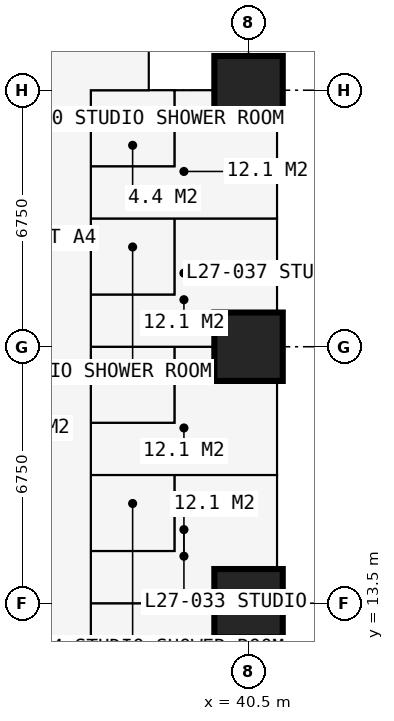
"""IFC4 building model, lengths in metres.
Left out: names, types, materials, properties, quantities, classifications, styles, units other than length and angle.
Written with IfcOpenShell. Run it as: python <this file> out.ifc"""

import sys

from ifc_helpers import new_model, si_unit, direction, frame, frame_2d, origin, origin_2d, place, context, subcontext, project, spatial, rectangle, extrude, element, fill, save


model = new_model("IFC4")
c1 = context("Model", 3, precision=1e-05, world=origin(), true_north=direction((0.0, 1.0)))
c2 = subcontext(c1, "Body", "Model", "MODEL_VIEW")
j1 = project(units=[si_unit("LENGTHUNIT", "METRE"), si_unit("PLANEANGLEUNIT", "RADIAN")], contexts=[c1])
p1 = place(None, origin())
s1 = spatial("IfcSite", under=j1, at=p1, CompositionType="ELEMENT")
p2 = place(p1, origin())
s2 = spatial("IfcBuilding", under=s1, at=p2, CompositionType="ELEMENT")
p3 = place(p2, frame((0.0, 0.0, 101.7)))
s3 = spatial("IfcBuildingStorey", under=s2, at=p3, CompositionType="ELEMENT", Elevation=101.7)
for number, where, z_axis, x_axis in (
    (1, (40.5, 13.5, 0.0), (0.0, 0.0, 1.0), (1.0, 0.0, 0.0)),
    (2, (40.5, 20.25, 0.0), (0.0, 0.0, 1.0), (1.0, 0.0, 0.0)),
    (3, (40.5, 27.0, 0.0), (0.0, 0.0, 1.0), (1.0, 0.0, 0.0)),
):
    element("IfcColumn", number, at=place(p3, frame(where, z_axis=z_axis, x_axis=x_axis)), inside=s3, PredefinedType="COLUMN", context=c2, shape_type="SweptSolid", body=[
        extrude(rectangle(XDim=1.8, YDim=1.8, at=origin_2d()), origin(), (0.0, 0.0, 1.0), 3.6),
    ])
p4 = place(p3, frame((41.25, 20.25, 0.0), z_axis=(0.0, 0.0, 1.0), x_axis=(0.0, -1.0, 0.0)))
e4 = element("IfcWall", 4, at=p4, inside=s3, PredefinedType="SOLIDWALL", context=c2, shape_type="SweptSolid", body=[
    extrude(rectangle(XDim=6.75, YDim=0.15, at=frame_2d((3.375, 0.0))), origin(), (0.0, 0.0, 1.0), 3.375),
])
p5 = place(p4, frame((0.962, 0.0, 0.0)))
e5 = element("IfcOpeningElement", 5, at=p5, cuts=e4, PredefinedType="OPENING", context=c2, shape_type="SweptSolid", body=[
    extrude(rectangle(XDim=1.0, YDim=2.2, at=frame_2d((0.5, 1.1))), frame((0.0, 0.085, 0.0), z_axis=(0.0, -1.0, 0.0), x_axis=(1.0, 0.0, 0.0)), (0.0, 0.0, 1.0), 0.17),
])
p6 = place(p4, frame((2.025, 0.0, 0.9)))
e6 = element("IfcOpeningElement", 6, at=p6, cuts=e4, PredefinedType="OPENING", context=c2, shape_type="SweptSolid", body=[
    extrude(rectangle(XDim=1.2, YDim=1.8, at=frame_2d((0.6, 0.9))), frame((0.0, 0.085, 0.0), z_axis=(0.0, -1.0, 0.0), x_axis=(1.0, 0.0, 0.0)), (0.0, 0.0, 1.0), 0.17),
])
p7 = place(p4, frame((4.788, 0.0, 0.0)))
e7 = element("IfcOpeningElement", 7, at=p7, cuts=e4, PredefinedType="OPENING", context=c2, shape_type="SweptSolid", body=[
    extrude(rectangle(XDim=1.0, YDim=2.2, at=frame_2d((0.5, 1.1))), frame((0.0, 0.085, 0.0), z_axis=(0.0, -1.0, 0.0), x_axis=(1.0, 0.0, 0.0)), (0.0, 0.0, 1.0), 0.17),
])
p8 = place(p4, frame((3.525, 0.0, 0.9)))
e8 = element("IfcOpeningElement", 8, at=p8, cuts=e4, PredefinedType="OPENING", context=c2, shape_type="SweptSolid", body=[
    extrude(rectangle(XDim=1.2, YDim=1.8, at=frame_2d((0.6, 0.9))), frame((0.0, 0.085, 0.0), z_axis=(0.0, -1.0, 0.0), x_axis=(1.0, 0.0, 0.0)), (0.0, 0.0, 1.0), 0.17),
])
p9 = place(p3, frame((41.25, 27.75, 0.0), z_axis=(0.0, 0.0, 1.0), x_axis=(-1.0, 0.0, 0.0)))
e9 = element("IfcWall", 9, at=p9, inside=s3, PredefinedType="SOLIDWALL", context=c2, shape_type="SweptSolid", body=[
    extrude(rectangle(XDim=3.375, YDim=0.3, at=frame_2d((1.688, 0.0))), origin(), (0.0, 0.0, 1.0), 3.375),
])
p10 = place(p9, frame((1.833, 0.0, 0.9)))
e10 = element("IfcOpeningElement", 10, at=p10, cuts=e9, PredefinedType="OPENING", context=c2, shape_type="SweptSolid", body=[
    extrude(rectangle(XDim=1.2, YDim=1.8, at=frame_2d((0.6, 0.9))), frame((0.0, 0.16, 0.0), z_axis=(0.0, -1.0, 0.0), x_axis=(1.0, 0.0, 0.0)), (0.0, 0.0, 1.0), 0.32),
])
p11 = place(p3, frame((37.875, 27.75, 0.0), z_axis=(0.0, 0.0, 1.0), x_axis=(0.0, 1.0, 0.0)))
e11 = element("IfcWall", 11, at=p11, inside=s3, PredefinedType="SOLIDWALL", context=c2, shape_type="SweptSolid", body=[
    extrude(rectangle(XDim=3.375, YDim=0.3, at=frame_2d((1.688, 0.0))), origin(), (0.0, 0.0, 1.0), 3.375),
])
p12 = place(p11, frame((0.788, 0.0, 0.6)))
e12 = element("IfcOpeningElement", 12, at=p12, cuts=e11, PredefinedType="OPENING", context=c2, shape_type="SweptSolid", body=[
    extrude(rectangle(XDim=1.8, YDim=2.1, at=frame_2d((0.9, 1.05))), frame((0.0, 0.16, 0.0), z_axis=(0.0, -1.0, 0.0), x_axis=(1.0, 0.0, 0.0)), (0.0, 0.0, 1.0), 0.32),
])
p13 = place(p3, frame((41.35, 16.875, 0.0), z_axis=(0.0, 0.0, 1.0), x_axis=(1.0, 0.0, 0.0)))
e13 = element("IfcWall", 13, at=p13, inside=s3, PredefinedType="USERDEFINED", context=c2, shape_type="SweptSolid", body=[
    extrude(rectangle(XDim=2.2, YDim=1.0, at=frame_2d((1.1, 0.0))), origin(), (0.0, 0.0, 1.0), 0.9),
])
p14 = place(p3, frame((36.35, 6.75, 0.0), z_axis=(0.0, 0.0, 1.0), x_axis=(0.0, 1.0, 0.0)))
e14 = element("IfcWall", 14, at=p14, inside=s3, PredefinedType="PARTITIONING", context=c2, shape_type="SweptSolid", body=[
    extrude(rectangle(XDim=20.25, YDim=0.15, at=frame_2d((10.125, 0.0))), origin(), (0.0, 0.0, 1.0), 3.375),
])
p15 = place(p14, frame((6.95, 0.0, 0.0)))
e15 = element("IfcOpeningElement", 15, at=p15, cuts=e14, PredefinedType="OPENING", context=c2, shape_type="SweptSolid", body=[
    extrude(rectangle(XDim=0.95, YDim=2.2, at=frame_2d((0.475, 1.1))), frame((0.0, 0.085, 0.0), z_axis=(0.0, -1.0, 0.0), x_axis=(1.0, 0.0, 0.0)), (0.0, 0.0, 1.0), 0.17),
])
p16 = place(p14, frame((10.375, 0.0, 0.0)))
e16 = element("IfcOpeningElement", 16, at=p16, cuts=e14, PredefinedType="OPENING", context=c2, shape_type="SweptSolid", body=[
    extrude(rectangle(XDim=0.95, YDim=2.2, at=frame_2d((0.475, 1.1))), frame((0.0, 0.085, 0.0), z_axis=(0.0, -1.0, 0.0), x_axis=(1.0, 0.0, 0.0)), (0.0, 0.0, 1.0), 0.17),
])
p17 = place(p14, frame((13.75, 0.0, 0.0)))
e17 = element("IfcOpeningElement", 17, at=p17, cuts=e14, PredefinedType="OPENING", context=c2, shape_type="SweptSolid", body=[
    extrude(rectangle(XDim=0.95, YDim=2.2, at=frame_2d((0.475, 1.1))), frame((0.0, 0.085, 0.0), z_axis=(0.0, -1.0, 0.0), x_axis=(1.0, 0.0, 0.0)), (0.0, 0.0, 1.0), 0.17),
])
p18 = place(p14, frame((17.125, 0.0, 0.0)))
e18 = element("IfcOpeningElement", 18, at=p18, cuts=e14, PredefinedType="OPENING", context=c2, shape_type="SweptSolid", body=[
    extrude(rectangle(XDim=0.95, YDim=2.2, at=frame_2d((0.475, 1.1))), frame((0.0, 0.085, 0.0), z_axis=(0.0, -1.0, 0.0), x_axis=(1.0, 0.0, 0.0)), (0.0, 0.0, 1.0), 0.17),
])
p19 = place(p3, frame((36.35, 13.5, 0.0), z_axis=(0.0, 0.0, 1.0), x_axis=(1.0, 0.0, 0.0)))
e19 = element("IfcWall", 19, at=p19, inside=s3, PredefinedType="PARTITIONING", context=c2, shape_type="SweptSolid", body=[
    extrude(rectangle(XDim=4.884, YDim=0.15, at=frame_2d((2.442, 0.0))), origin(), (0.0, 0.0, 1.0), 2.877),
])
p20 = place(p3, frame((36.35, 14.875, 0.0), z_axis=(0.0, 0.0, 1.0), x_axis=(1.0, 0.0, 0.0)))
e20 = element("IfcWall", 20, at=p20, inside=s3, PredefinedType="PARTITIONING", context=c2, shape_type="SweptSolid", body=[
    extrude(rectangle(XDim=2.2, YDim=0.1, at=frame_2d((1.1, 0.0))), origin(), (0.0, 0.0, 1.0), 3.375),
])
p21 = place(p20, frame((0.65, 0.0, 0.0)))
e21 = element("IfcOpeningElement", 21, at=p21, cuts=e20, PredefinedType="OPENING", context=c2, shape_type="SweptSolid", body=[
    extrude(rectangle(XDim=0.9, YDim=2.2, at=frame_2d((0.45, 1.1))), frame((0.0, 0.06, 0.0), z_axis=(0.0, -1.0, 0.0), x_axis=(1.0, 0.0, 0.0)), (0.0, 0.0, 1.0), 0.12),
])
p22 = place(p3, frame((36.35, 16.875, 0.0), z_axis=(0.0, 0.0, 1.0), x_axis=(1.0, 0.0, 0.0)))
e22 = element("IfcWall", 22, at=p22, inside=s3, PredefinedType="PARTITIONING", context=c2, shape_type="SweptSolid", body=[
    extrude(rectangle(XDim=4.884, YDim=0.175, at=frame_2d((2.442, 0.0))), origin(), (0.0, 0.0, 1.0), 3.375),
])
p23 = place(p3, frame((36.35, 18.25, 0.0), z_axis=(0.0, 0.0, 1.0), x_axis=(1.0, 0.0, 0.0)))
e23 = element("IfcWall", 23, at=p23, inside=s3, PredefinedType="PARTITIONING", context=c2, shape_type="SweptSolid", body=[
    extrude(rectangle(XDim=2.2, YDim=0.1, at=frame_2d((1.1, 0.0))), origin(), (0.0, 0.0, 1.0), 3.375),
])
p24 = place(p23, frame((0.65, 0.0, 0.0)))
e24 = element("IfcOpeningElement", 24, at=p24, cuts=e23, PredefinedType="OPENING", context=c2, shape_type="SweptSolid", body=[
    extrude(rectangle(XDim=0.9, YDim=2.2, at=frame_2d((0.45, 1.1))), frame((0.0, 0.06, 0.0), z_axis=(0.0, -1.0, 0.0), x_axis=(1.0, 0.0, 0.0)), (0.0, 0.0, 1.0), 0.12),
])
p25 = place(p3, frame((36.35, 20.25, 0.0), z_axis=(0.0, 0.0, 1.0), x_axis=(1.0, 0.0, 0.0)))
e25 = element("IfcWall", 25, at=p25, inside=s3, PredefinedType="PARTITIONING", context=c2, shape_type="SweptSolid", body=[
    extrude(rectangle(XDim=4.884, YDim=0.175, at=frame_2d((2.442, 0.0))), origin(), (0.0, 0.0, 1.0), 2.877),
])
p26 = place(p3, frame((36.35, 21.625, 0.0), z_axis=(0.0, 0.0, 1.0), x_axis=(1.0, 0.0, 0.0)))
e26 = element("IfcWall", 26, at=p26, inside=s3, PredefinedType="PARTITIONING", context=c2, shape_type="SweptSolid", body=[
    extrude(rectangle(XDim=2.2, YDim=0.1, at=frame_2d((1.1, 0.0))), origin(), (0.0, 0.0, 1.0), 3.375),
])
p27 = place(p26, frame((0.65, 0.0, 0.0)))
e27 = element("IfcOpeningElement", 27, at=p27, cuts=e26, PredefinedType="OPENING", context=c2, shape_type="SweptSolid", body=[
    extrude(rectangle(XDim=0.9, YDim=2.2, at=frame_2d((0.45, 1.1))), frame((0.0, 0.06, 0.0), z_axis=(0.0, -1.0, 0.0), x_axis=(1.0, 0.0, 0.0)), (0.0, 0.0, 1.0), 0.12),
])
p28 = place(p3, frame((36.35, 23.625, 0.0), z_axis=(0.0, 0.0, 1.0), x_axis=(1.0, 0.0, 0.0)))
e28 = element("IfcWall", 28, at=p28, inside=s3, PredefinedType="PARTITIONING", context=c2, shape_type="SweptSolid", body=[
    extrude(rectangle(XDim=4.884, YDim=0.175, at=frame_2d((2.442, 0.0))), origin(), (0.0, 0.0, 1.0), 3.375),
])
p29 = place(p3, frame((36.35, 25.0, 0.0), z_axis=(0.0, 0.0, 1.0), x_axis=(1.0, 0.0, 0.0)))
e29 = element("IfcWall", 29, at=p29, inside=s3, PredefinedType="PARTITIONING", context=c2, shape_type="SweptSolid", body=[
    extrude(rectangle(XDim=2.2, YDim=0.1, at=frame_2d((1.1, 0.0))), origin(), (0.0, 0.0, 1.0), 3.375),
])
p30 = place(p29, frame((0.65, 0.0, 0.0)))
e30 = element("IfcOpeningElement", 30, at=p30, cuts=e29, PredefinedType="OPENING", context=c2, shape_type="SweptSolid", body=[
    extrude(rectangle(XDim=0.9, YDim=2.2, at=frame_2d((0.45, 1.1))), frame((0.0, 0.06, 0.0), z_axis=(0.0, -1.0, 0.0), x_axis=(1.0, 0.0, 0.0)), (0.0, 0.0, 1.0), 0.12),
])
p31 = place(p3, frame((36.35, 27.0, 0.0), z_axis=(0.0, 0.0, 1.0), x_axis=(1.0, 0.0, 0.0)))
e31 = element("IfcWall", 31, at=p31, inside=s3, PredefinedType="PARTITIONING", context=c2, shape_type="SweptSolid", body=[
    extrude(rectangle(XDim=4.884, YDim=0.175, at=frame_2d((2.442, 0.0))), origin(), (0.0, 0.0, 1.0), 2.877),
])
p32 = place(p3, frame((37.875, 27.0, 0.0), z_axis=(0.0, 0.0, 1.0), x_axis=(0.0, 1.0, 0.0)))
e32 = element("IfcWall", 32, at=p32, inside=s3, PredefinedType="PARTITIONING", context=c2, shape_type="SweptSolid", body=[
    extrude(rectangle(XDim=0.734, YDim=0.15, at=frame_2d((0.367, 0.0))), origin(), (0.0, 0.0, 1.0), 3.375),
])
for number, where, z_axis, x_axis in (
    (33, (38.55, 14.875, 0.0), (0.0, 0.0, 1.0), (0.0, 1.0, 0.0)),
    (34, (38.55, 18.25, 0.0), (0.0, 0.0, 1.0), (0.0, 1.0, 0.0)),
    (35, (38.55, 21.625, 0.0), (0.0, 0.0, 1.0), (0.0, 1.0, 0.0)),
    (36, (38.55, 25.0, 0.0), (0.0, 0.0, 1.0), (0.0, 1.0, 0.0)),
):
    element("IfcWall", number, at=place(p3, frame(where, z_axis=z_axis, x_axis=x_axis)), inside=s3, PredefinedType="PARTITIONING", context=c2, shape_type="SweptSolid", body=[
        extrude(rectangle(XDim=2.0, YDim=0.1, at=frame_2d((1.0, 0.0))), origin(), (0.0, 0.0, 1.0), 3.375),
    ])
p33 = place(p5, origin())
e37 = element("IfcDoor", 37, at=p33, inside=s3, OperationType="SINGLE_SWING_LEFT", PredefinedType="DOOR", context=c2, shape_type="SweptSolid", body=[
    extrude(rectangle(XDim=1.0, YDim=2.2, at=frame_2d((0.5, 1.1))), frame((0.0, 0.025, 0.0), z_axis=(0.0, -1.0, 0.0), x_axis=(1.0, 0.0, 0.0)), (0.0, 0.0, 1.0), 0.05),
])
fill(e5, e37)
p34 = place(p6, origin())
e38 = element("IfcWindow", 38, at=p34, inside=s3, PartitioningType="SINGLE_PANEL", PredefinedType="WINDOW", context=c2, shape_type="SweptSolid", body=[
    extrude(rectangle(XDim=1.2, YDim=1.8, at=frame_2d((0.6, 0.9))), frame((0.0, 0.03, 0.0), z_axis=(0.0, -1.0, 0.0), x_axis=(1.0, 0.0, 0.0)), (0.0, 0.0, 1.0), 0.06),
])
fill(e6, e38)
p35 = place(p7, origin())
e39 = element("IfcDoor", 39, at=p35, inside=s3, OperationType="SINGLE_SWING_RIGHT", PredefinedType="DOOR", context=c2, shape_type="SweptSolid", body=[
    extrude(rectangle(XDim=1.0, YDim=2.2, at=frame_2d((0.5, 1.1))), frame((0.0, 0.025, 0.0), z_axis=(0.0, -1.0, 0.0), x_axis=(1.0, 0.0, 0.0)), (0.0, 0.0, 1.0), 0.05),
])
fill(e7, e39)
p36 = place(p8, origin())
e40 = element("IfcWindow", 40, at=p36, inside=s3, PartitioningType="SINGLE_PANEL", PredefinedType="WINDOW", context=c2, shape_type="SweptSolid", body=[
    extrude(rectangle(XDim=1.2, YDim=1.8, at=frame_2d((0.6, 0.9))), frame((0.0, 0.03, 0.0), z_axis=(0.0, -1.0, 0.0), x_axis=(1.0, 0.0, 0.0)), (0.0, 0.0, 1.0), 0.06),
])
fill(e8, e40)
p37 = place(p10, origin())
e41 = element("IfcWindow", 41, at=p37, inside=s3, PartitioningType="SINGLE_PANEL", PredefinedType="WINDOW", context=c2, shape_type="SweptSolid", body=[
    extrude(rectangle(XDim=1.2, YDim=1.8, at=frame_2d((0.6, 0.9))), frame((0.0, 0.03, 0.0), z_axis=(0.0, -1.0, 0.0), x_axis=(1.0, 0.0, 0.0)), (0.0, 0.0, 1.0), 0.06),
])
fill(e10, e41)
p38 = place(p15, origin())
e42 = element("IfcDoor", 42, at=p38, inside=s3, OperationType="SINGLE_SWING_LEFT", PredefinedType="DOOR", context=c2, shape_type="SweptSolid", body=[
    extrude(rectangle(XDim=0.95, YDim=2.2, at=frame_2d((0.475, 1.1))), frame((0.0, 0.025, 0.0), z_axis=(0.0, -1.0, 0.0), x_axis=(1.0, 0.0, 0.0)), (0.0, 0.0, 1.0), 0.05),
])
fill(e15, e42)
p39 = place(p21, origin())
e43 = element("IfcDoor", 43, at=p39, inside=s3, OperationType="SINGLE_SWING_RIGHT", PredefinedType="DOOR", context=c2, shape_type="SweptSolid", body=[
    extrude(rectangle(XDim=0.9, YDim=2.2, at=frame_2d((0.45, 1.1))), frame((0.0, 0.025, 0.0), z_axis=(0.0, -1.0, 0.0), x_axis=(1.0, 0.0, 0.0)), (0.0, 0.0, 1.0), 0.05),
])
fill(e21, e43)
p40 = place(p16, origin())
e44 = element("IfcDoor", 44, at=p40, inside=s3, OperationType="SINGLE_SWING_LEFT", PredefinedType="DOOR", context=c2, shape_type="SweptSolid", body=[
    extrude(rectangle(XDim=0.95, YDim=2.2, at=frame_2d((0.475, 1.1))), frame((0.0, 0.025, 0.0), z_axis=(0.0, -1.0, 0.0), x_axis=(1.0, 0.0, 0.0)), (0.0, 0.0, 1.0), 0.05),
])
fill(e16, e44)
p41 = place(p24, origin())
e45 = element("IfcDoor", 45, at=p41, inside=s3, OperationType="SINGLE_SWING_RIGHT", PredefinedType="DOOR", context=c2, shape_type="SweptSolid", body=[
    extrude(rectangle(XDim=0.9, YDim=2.2, at=frame_2d((0.45, 1.1))), frame((0.0, 0.025, 0.0), z_axis=(0.0, -1.0, 0.0), x_axis=(1.0, 0.0, 0.0)), (0.0, 0.0, 1.0), 0.05),
])
fill(e24, e45)
p42 = place(p17, origin())
e46 = element("IfcDoor", 46, at=p42, inside=s3, OperationType="SINGLE_SWING_LEFT", PredefinedType="DOOR", context=c2, shape_type="SweptSolid", body=[
    extrude(rectangle(XDim=0.95, YDim=2.2, at=frame_2d((0.475, 1.1))), frame((0.0, 0.025, 0.0), z_axis=(0.0, -1.0, 0.0), x_axis=(1.0, 0.0, 0.0)), (0.0, 0.0, 1.0), 0.05),
])
fill(e17, e46)
p43 = place(p27, origin())
e47 = element("IfcDoor", 47, at=p43, inside=s3, OperationType="SINGLE_SWING_RIGHT", PredefinedType="DOOR", context=c2, shape_type="SweptSolid", body=[
    extrude(rectangle(XDim=0.9, YDim=2.2, at=frame_2d((0.45, 1.1))), frame((0.0, 0.025, 0.0), z_axis=(0.0, -1.0, 0.0), x_axis=(1.0, 0.0, 0.0)), (0.0, 0.0, 1.0), 0.05),
])
fill(e27, e47)
p44 = place(p18, origin())
e48 = element("IfcDoor", 48, at=p44, inside=s3, OperationType="SINGLE_SWING_LEFT", PredefinedType="DOOR", context=c2, shape_type="SweptSolid", body=[
    extrude(rectangle(XDim=0.95, YDim=2.2, at=frame_2d((0.475, 1.1))), frame((0.0, 0.025, 0.0), z_axis=(0.0, -1.0, 0.0), x_axis=(1.0, 0.0, 0.0)), (0.0, 0.0, 1.0), 0.05),
])
fill(e18, e48)
p45 = place(p30, origin())
e49 = element("IfcDoor", 49, at=p45, inside=s3, OperationType="SINGLE_SWING_RIGHT", PredefinedType="DOOR", context=c2, shape_type="SweptSolid", body=[
    extrude(rectangle(XDim=0.9, YDim=2.2, at=frame_2d((0.45, 1.1))), frame((0.0, 0.025, 0.0), z_axis=(0.0, -1.0, 0.0), x_axis=(1.0, 0.0, 0.0)), (0.0, 0.0, 1.0), 0.05),
])
fill(e30, e49)
save(model, sys.argv[1])
